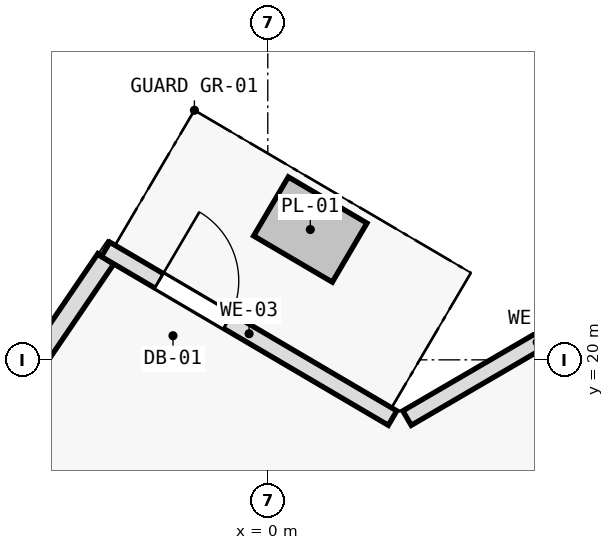
"""IFC4 building model, lengths in metres.
Left out: names, types, materials, properties, quantities, classifications, styles, units other than length and angle.
Written with IfcOpenShell. Run it as: python <this file> out.ifc"""

import sys

from ifc_helpers import new_model, si_unit, direction, frame, frame_2d, origin, place, context, subcontext, project, spatial, rectangle, extrude, element, fill, save


model = new_model("IFC4")
c1 = context("Model", 3, precision=1e-05, world=origin(), true_north=direction((0.0, 1.0)))
c2 = subcontext(c1, "Body", "Model", "MODEL_VIEW")
j1 = project(units=[si_unit("LENGTHUNIT", "METRE"), si_unit("PLANEANGLEUNIT", "RADIAN")], contexts=[c1])
p1 = place(None, origin())
s1 = spatial("IfcSite", under=j1, at=p1, CompositionType="ELEMENT")
p2 = place(p1, origin())
s2 = spatial("IfcBuilding", under=s1, at=p2, CompositionType="ELEMENT")
p3 = place(p2, frame((0.0, 0.0, 265.2)))
s3 = spatial("IfcBuildingStorey", under=s2, at=p3, CompositionType="ELEMENT", Elevation=265.2)
p4 = place(p3, frame((-7.817, 12.971, 0.0), z_axis=(0.0, 0.0, 1.0), x_axis=(0.562474530687, 0.826814611826, 0.0)))
e1 = element("IfcWall", 1, at=p4, inside=s3, PredefinedType="SOLIDWALL", context=c2, shape_type="SweptSolid", body=[
    extrude(rectangle(XDim=10.107, YDim=0.25, at=frame_2d((5.053, 0.0))), origin(), (0.0, 0.0, 1.0), 3.35),
])
p5 = place(p4, frame((4.253, 0.0, 0.62)))
e2 = element("IfcOpeningElement", 2, at=p5, cuts=e1, PredefinedType="OPENING", context=c2, shape_type="SweptSolid", body=[
    extrude(rectangle(XDim=1.6, YDim=2.1, at=frame_2d((0.8, 1.05))), frame((0.0, 0.135, 0.0), z_axis=(0.0, -1.0, 0.0), x_axis=(1.0, 0.0, 0.0)), (0.0, 0.0, 1.0), 0.27),
])
p6 = place(p3, frame((1.832, 19.234, 0.0), z_axis=(0.0, 0.0, 1.0), x_axis=(0.86397765749, 0.503530145432, 0.0)))
e3 = element("IfcWall", 3, at=p6, inside=s3, PredefinedType="SOLIDWALL", context=c2, shape_type="SweptSolid", body=[
    extrude(rectangle(XDim=3.964, YDim=0.22, at=frame_2d((1.982, 0.0))), origin(), (0.0, 0.0, 1.0), 3.35),
])
p7 = place(p3, frame((-2.134, 21.453, 0.0), z_axis=(0.0, 0.0, 1.0), x_axis=(0.862106131527, -0.506727755292, 0.0)))
e4 = element("IfcWall", 4, at=p7, inside=s3, PredefinedType="SOLIDWALL", context=c2, shape_type="SweptSolid", body=[
    extrude(rectangle(XDim=4.38, YDim=0.22, at=frame_2d((2.19, 0.0))), origin(), (0.0, 0.0, 1.0), 3.35),
])
p8 = place(p7, frame((0.815, 0.0, 0.0)))
e5 = element("IfcOpeningElement", 5, at=p8, cuts=e4, PredefinedType="OPENING", context=c2, shape_type="SweptSolid", body=[
    extrude(rectangle(XDim=1.05, YDim=2.15, at=frame_2d((0.525, 1.075))), frame((0.0, 0.12, 0.0), z_axis=(0.0, -1.0, 0.0), x_axis=(1.0, 0.0, 0.0)), (0.0, 0.0, 1.0), 0.24),
])
p9 = place(p8, origin())
e6 = element("IfcDoor", 6, at=p9, inside=s3, OperationType="SINGLE_SWING_LEFT", PredefinedType="DOOR", context=c2, shape_type="SweptSolid", body=[
    extrude(rectangle(XDim=1.05, YDim=2.15, at=frame_2d((0.525, 1.075))), frame((0.0, 0.025, 0.0), z_axis=(0.0, -1.0, 0.0), x_axis=(1.0, 0.0, 0.0)), (0.0, 0.0, 1.0), 0.05),
])
fill(e5, e6)
save(model, sys.argv[1])
